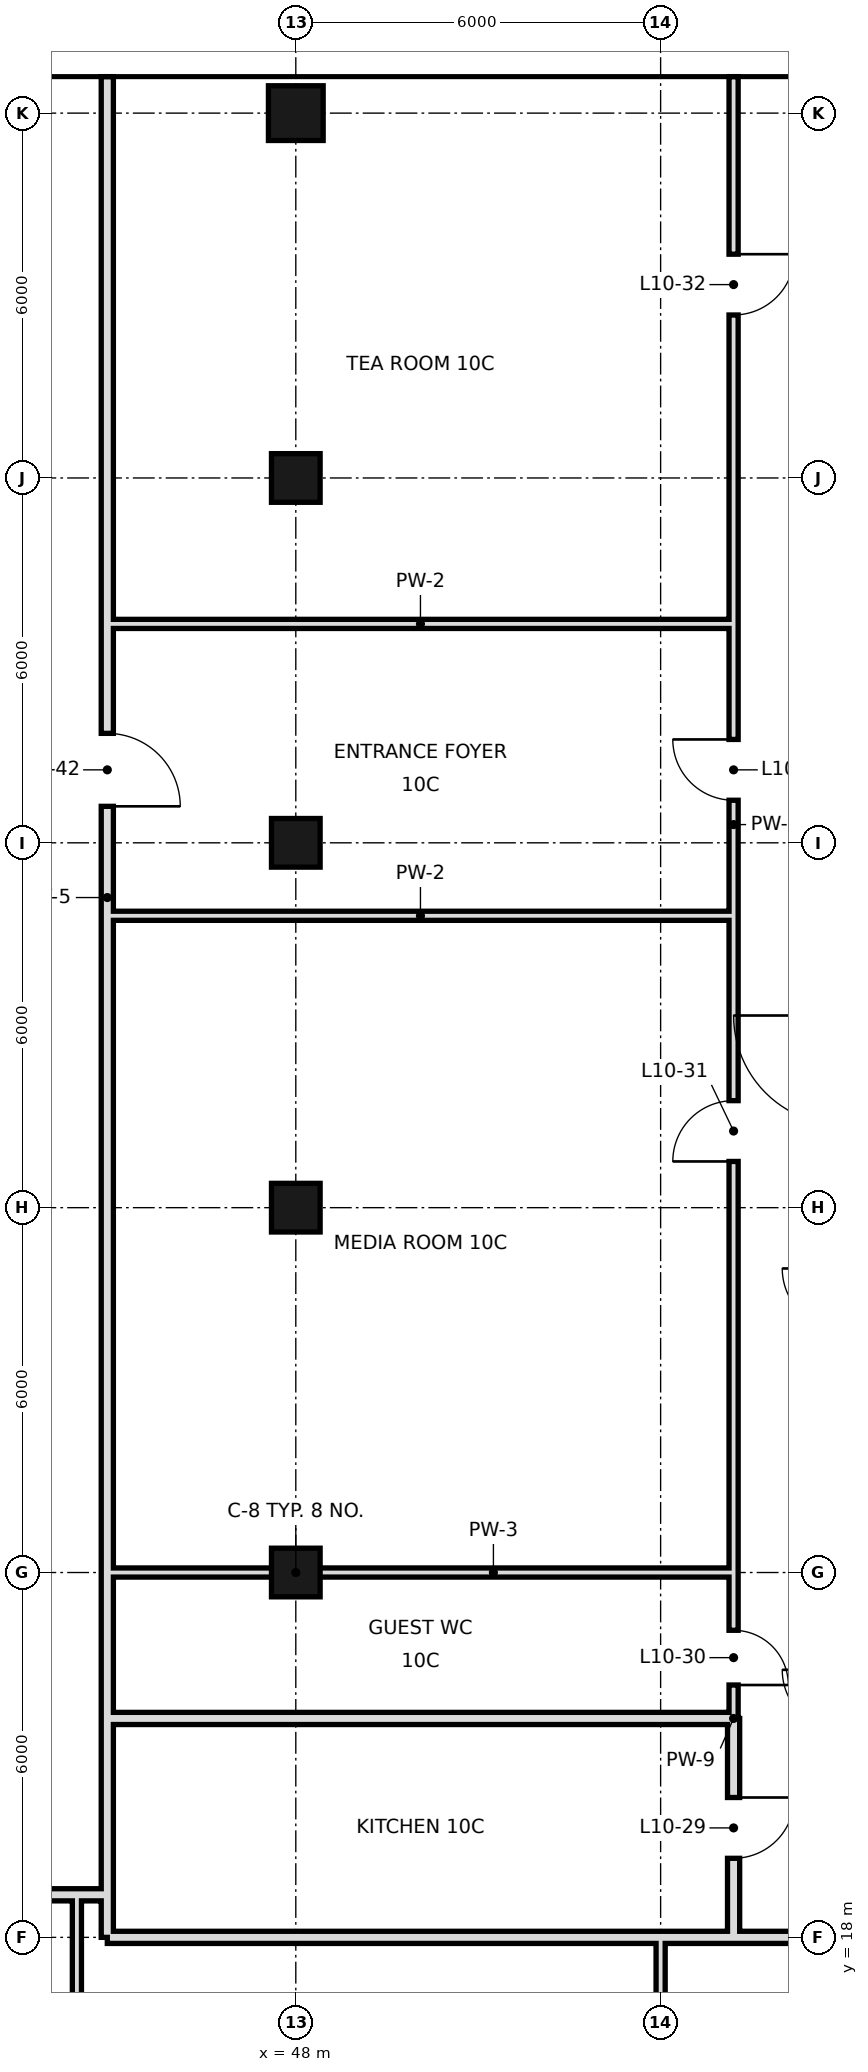
"""IFC4 building model, lengths in metres.
Left out: names, types, materials, properties, quantities, classifications, styles, units other than length and angle.
Written with IfcOpenShell. Run it as: python <this file> out.ifc"""

import sys

from ifc_helpers import new_model, si_unit, direction, frame, frame_2d, origin, origin_2d, place, context, subcontext, project, spatial, rectangle, hollow_rectangle, extrude, element, fill, save


model = new_model("IFC4")
c1 = context("Model", 3, precision=1e-05, world=origin(), true_north=direction((0.0, 1.0)))
c2 = subcontext(c1, "Body", "Model", "MODEL_VIEW")
j1 = project(units=[si_unit("LENGTHUNIT", "METRE"), si_unit("PLANEANGLEUNIT", "RADIAN")], contexts=[c1])
p1 = place(None, origin())
s1 = spatial("IfcSite", under=j1, at=p1, CompositionType="ELEMENT")
p2 = place(p1, origin())
s2 = spatial("IfcBuilding", under=s1, at=p2, CompositionType="ELEMENT")
p3 = place(p2, frame((0.0, 0.0, 57.0)))
s3 = spatial("IfcBuildingStorey", under=s2, at=p3, CompositionType="ELEMENT", Elevation=57.0)
for number, where, z_axis, x_axis in (
    (1, (48.0, 24.0, 0.0), (0.0, 0.0, 1.0), (1.0, 0.0, 0.0)),
    (2, (48.0, 30.0, 0.0), (0.0, 0.0, 1.0), (1.0, 0.0, 0.0)),
    (3, (48.0, 36.0, 0.0), (0.0, 0.0, 1.0), (1.0, 0.0, 0.0)),
    (4, (48.0, 42.0, 0.0), (0.0, 0.0, 1.0), (1.0, 0.0, 0.0)),
):
    element("IfcColumn", number, at=place(p3, frame(where, z_axis=z_axis, x_axis=x_axis)), inside=s3, PredefinedType="COLUMN", context=c2, shape_type="SweptSolid", body=[
        extrude(hollow_rectangle(XDim=0.8, YDim=0.8, WallThickness=0.04, at=origin_2d()), origin(), (0.0, 0.0, 1.0), 3.6),
    ])
p4 = place(p3, frame((48.0, 48.0, 0.0), z_axis=(0.0, 0.0, 1.0), x_axis=(1.0, 0.0, 0.0)))
e5 = element("IfcColumn", 5, at=p4, inside=s3, PredefinedType="COLUMN", context=c2, shape_type="SweptSolid", body=[
    extrude(hollow_rectangle(XDim=0.9, YDim=0.9, WallThickness=0.045, at=origin_2d()), origin(), (0.0, 0.0, 1.0), 3.6),
])
p5 = place(p3, frame((44.4, 10.8, 0.0), z_axis=(0.0, 0.0, 1.0), x_axis=(0.0, 1.0, 0.0)))
e6 = element("IfcWall", 6, at=p5, inside=s3, PredefinedType="PARTITIONING", context=c2, shape_type="SweptSolid", body=[
    extrude(rectangle(XDim=7.9, YDim=0.15, at=frame_2d((3.95, 0.0))), origin(), (0.0, 0.0, 1.0), 3.42),
])
p6 = place(p3, frame((44.9, 21.6, 0.0), z_axis=(0.0, 0.0, 1.0), x_axis=(0.0, 1.0, 0.0)))
e7 = element("IfcWall", 7, at=p6, inside=s3, PredefinedType="SOLIDWALL", context=c2, shape_type="SweptSolid", body=[
    extrude(rectangle(XDim=27.0, YDim=0.2, at=frame_2d((13.5, 0.0))), origin(), (0.0, 0.0, 1.0), 2.72),
])
p7 = place(p6, frame((15.0, 0.0, 0.0)))
e8 = element("IfcOpeningElement", 8, at=p7, cuts=e7, PredefinedType="OPENING", context=c2, shape_type="SweptSolid", body=[
    extrude(rectangle(XDim=1.2, YDim=2.4, at=frame_2d((0.6, 1.2))), frame((0.0, 0.11, 0.0), z_axis=(0.0, -1.0, 0.0), x_axis=(1.0, 0.0, 0.0)), (0.0, 0.0, 1.0), 0.22),
])
p8 = place(p3, frame((44.9, 18.0, 0.0), z_axis=(0.0, 0.0, 1.0), x_axis=(0.0, 1.0, 0.0)))
e9 = element("IfcWall", 9, at=p8, inside=s3, PredefinedType="SOLIDWALL", context=c2, shape_type="SweptSolid", body=[
    extrude(rectangle(XDim=3.6, YDim=0.2, at=frame_2d((1.8, 0.0))), origin(), (0.0, 0.0, 1.0), 2.97),
])
p9 = place(p3, frame((54.0, 10.8, 0.0), z_axis=(0.0, 0.0, 1.0), x_axis=(0.0, 1.0, 0.0)))
e10 = element("IfcWall", 10, at=p9, inside=s3, PredefinedType="PARTITIONING", context=c2, shape_type="SweptSolid", body=[
    extrude(rectangle(XDim=7.2, YDim=0.15, at=frame_2d((3.6, 0.0))), origin(), (0.0, 0.0, 1.0), 3.42),
])
p10 = place(p3, frame((55.2, 18.0, 0.0), z_axis=(0.0, 0.0, 1.0), x_axis=(0.0, 1.0, 0.0)))
e11 = element("IfcWall", 11, at=p10, inside=s3, PredefinedType="SOLIDWALL", context=c2, shape_type="SweptSolid", body=[
    extrude(rectangle(XDim=3.6, YDim=0.2, at=frame_2d((1.8, 0.0))), origin(), (0.0, 0.0, 1.0), 2.52),
])
p11 = place(p10, frame((1.3, 0.0, 0.0)))
e12 = element("IfcOpeningElement", 12, at=p11, cuts=e11, PredefinedType="OPENING", context=c2, shape_type="SweptSolid", body=[
    extrude(rectangle(XDim=1.0, YDim=2.4, at=frame_2d((0.5, 1.2))), frame((0.0, 0.11, 0.0), z_axis=(0.0, -1.0, 0.0), x_axis=(1.0, 0.0, 0.0)), (0.0, 0.0, 1.0), 0.22),
])
p12 = place(p3, frame((55.2, 24.0, 0.0), z_axis=(0.0, 0.0, 1.0), x_axis=(0.0, 1.0, 0.0)))
e13 = element("IfcWall", 13, at=p12, inside=s3, PredefinedType="PARTITIONING", context=c2, shape_type="SweptSolid", body=[
    extrude(rectangle(XDim=24.6, YDim=0.15, at=frame_2d((12.3, 0.0))), origin(), (0.0, 0.0, 1.0), 3.42),
])
p13 = place(p12, frame((12.7, 0.0, 0.0)))
e14 = element("IfcOpeningElement", 14, at=p13, cuts=e13, PredefinedType="OPENING", context=c2, shape_type="SweptSolid", body=[
    extrude(rectangle(XDim=1.0, YDim=2.4, at=frame_2d((0.5, 1.2))), frame((0.0, 0.085, 0.0), z_axis=(0.0, -1.0, 0.0), x_axis=(1.0, 0.0, 0.0)), (0.0, 0.0, 1.0), 0.17),
])
p14 = place(p12, frame((6.76, 0.0, 0.0)))
e15 = element("IfcOpeningElement", 15, at=p14, cuts=e13, PredefinedType="OPENING", context=c2, shape_type="SweptSolid", body=[
    extrude(rectangle(XDim=1.0, YDim=2.4, at=frame_2d((0.5, 1.2))), frame((0.0, 0.085, 0.0), z_axis=(0.0, -1.0, 0.0), x_axis=(1.0, 0.0, 0.0)), (0.0, 0.0, 1.0), 0.17),
])
p15 = place(p12, frame((20.68, 0.0, 0.0)))
e16 = element("IfcOpeningElement", 16, at=p15, cuts=e13, PredefinedType="OPENING", context=c2, shape_type="SweptSolid", body=[
    extrude(rectangle(XDim=1.0, YDim=2.4, at=frame_2d((0.5, 1.2))), frame((0.0, 0.085, 0.0), z_axis=(0.0, -1.0, 0.0), x_axis=(1.0, 0.0, 0.0)), (0.0, 0.0, 1.0), 0.17),
])
p16 = place(p3, frame((55.2, 21.6, 0.0), z_axis=(0.0, 0.0, 1.0), x_axis=(0.0, 1.0, 0.0)))
e17 = element("IfcWall", 17, at=p16, inside=s3, PredefinedType="PARTITIONING", context=c2, shape_type="SweptSolid", body=[
    extrude(rectangle(XDim=2.4, YDim=0.15, at=frame_2d((1.2, 0.0))), origin(), (0.0, 0.0, 1.0), 3.42),
])
p17 = place(p16, frame((0.55, 0.0, 0.0)))
e18 = element("IfcOpeningElement", 18, at=p17, cuts=e17, PredefinedType="OPENING", context=c2, shape_type="SweptSolid", body=[
    extrude(rectangle(XDim=0.9, YDim=2.4, at=frame_2d((0.45, 1.2))), frame((0.0, 0.085, 0.0), z_axis=(0.0, -1.0, 0.0), x_axis=(1.0, 0.0, 0.0)), (0.0, 0.0, 1.0), 0.17),
])
p18 = place(p3, frame((44.9, 18.0, 0.0), z_axis=(0.0, 0.0, 1.0), x_axis=(1.0, 0.0, 0.0)))
e19 = element("IfcWall", 19, at=p18, inside=s3, PredefinedType="SOLIDWALL", context=c2, shape_type="SweptSolid", body=[
    extrude(rectangle(XDim=10.3, YDim=0.2, at=frame_2d((5.15, 0.0))), origin(), (0.0, 0.0, 1.0), 2.52),
])
p19 = place(p3, frame((55.2, 18.0, 0.0), z_axis=(0.0, 0.0, 1.0), x_axis=(1.0, 0.0, 0.0)))
e20 = element("IfcWall", 20, at=p19, inside=s3, PredefinedType="SOLIDWALL", context=c2, shape_type="SweptSolid", body=[
    extrude(rectangle(XDim=5.4, YDim=0.2, at=frame_2d((2.7, 0.0))), origin(), (0.0, 0.0, 1.0), 2.52),
])
p20 = place(p3, frame((6.6, 18.7, 0.0), z_axis=(0.0, 0.0, 1.0), x_axis=(1.0, 0.0, 0.0)))
e21 = element("IfcWall", 21, at=p20, inside=s3, PredefinedType="SOLIDWALL", context=c2, shape_type="SweptSolid", body=[
    extrude(rectangle(XDim=38.3, YDim=0.2, at=frame_2d((19.15, 0.0))), origin(), (0.0, 0.0, 1.0), 2.72),
])
p21 = place(p20, frame((25.8, 0.0, 0.0)))
e22 = element("IfcOpeningElement", 22, at=p21, cuts=e21, PredefinedType="OPENING", context=c2, shape_type="SweptSolid", body=[
    extrude(rectangle(XDim=1.2, YDim=2.4, at=frame_2d((0.6, 1.2))), frame((0.0, 0.11, 0.0), z_axis=(0.0, -1.0, 0.0), x_axis=(1.0, 0.0, 0.0)), (0.0, 0.0, 1.0), 0.22),
])
p22 = place(p20, frame((33.34, 0.0, 0.0)))
e23 = element("IfcOpeningElement", 23, at=p22, cuts=e21, PredefinedType="OPENING", context=c2, shape_type="SweptSolid", body=[
    extrude(rectangle(XDim=1.2, YDim=2.4, at=frame_2d((0.6, 1.2))), frame((0.0, 0.11, 0.0), z_axis=(0.0, -1.0, 0.0), x_axis=(1.0, 0.0, 0.0)), (0.0, 0.0, 1.0), 0.22),
])
p23 = place(p3, frame((44.9, 21.6, 0.0), z_axis=(0.0, 0.0, 1.0), x_axis=(1.0, 0.0, 0.0)))
e24 = element("IfcWall", 24, at=p23, inside=s3, PredefinedType="SOLIDWALL", context=c2, shape_type="SweptSolid", body=[
    extrude(rectangle(XDim=10.3, YDim=0.2, at=frame_2d((5.15, 0.0))), origin(), (0.0, 0.0, 1.0), 2.72),
])
p24 = place(p3, frame((44.9, 24.0, 0.0), z_axis=(0.0, 0.0, 1.0), x_axis=(1.0, 0.0, 0.0)))
e25 = element("IfcWall", 25, at=p24, inside=s3, PredefinedType="PARTITIONING", context=c2, shape_type="SweptSolid", body=[
    extrude(rectangle(XDim=10.3, YDim=0.15, at=frame_2d((5.15, 0.0))), origin(), (0.0, 0.0, 1.0), 2.52),
])
for number, where, z_axis, x_axis in (
    (26, (44.9, 34.8, 0.0), (0.0, 0.0, 1.0), (1.0, 0.0, 0.0)),
    (27, (44.9, 39.6, 0.0), (0.0, 0.0, 1.0), (1.0, 0.0, 0.0)),
):
    element("IfcWall", number, at=place(p3, frame(where, z_axis=z_axis, x_axis=x_axis)), inside=s3, PredefinedType="PARTITIONING", context=c2, shape_type="SweptSolid", body=[
        extrude(rectangle(XDim=10.3, YDim=0.15, at=frame_2d((5.15, 0.0))), origin(), (0.0, 0.0, 1.0), 3.42),
    ])
p25 = place(p13, frame((1.0, 0.0, 0.0), z_axis=(0.0, 0.0, 1.0), x_axis=(-1.0, 0.0, 0.0)))
e28 = element("IfcDoor", 28, at=p25, inside=s3, OperationType="SINGLE_SWING_LEFT", PredefinedType="DOOR", context=c2, shape_type="SweptSolid", body=[
    extrude(rectangle(XDim=1.0, YDim=2.4, at=frame_2d((0.5, 1.2))), frame((0.0, 0.025, 0.0), z_axis=(0.0, -1.0, 0.0), x_axis=(1.0, 0.0, 0.0)), (0.0, 0.0, 1.0), 0.05),
])
fill(e14, e28)
p26 = place(p11, origin())
e29 = element("IfcDoor", 29, at=p26, inside=s3, OperationType="SINGLE_SWING_RIGHT", PredefinedType="DOOR", context=c2, shape_type="SweptSolid", body=[
    extrude(rectangle(XDim=1.0, YDim=2.4, at=frame_2d((0.5, 1.2))), frame((0.0, 0.025, 0.0), z_axis=(0.0, -1.0, 0.0), x_axis=(1.0, 0.0, 0.0)), (0.0, 0.0, 1.0), 0.05),
])
fill(e12, e29)
p27 = place(p17, frame((0.9, 0.0, 0.0), z_axis=(0.0, 0.0, 1.0), x_axis=(-1.0, 0.0, 0.0)))
e30 = element("IfcDoor", 30, at=p27, inside=s3, OperationType="SINGLE_SWING_RIGHT", PredefinedType="DOOR", context=c2, shape_type="SweptSolid", body=[
    extrude(rectangle(XDim=0.9, YDim=2.4, at=frame_2d((0.45, 1.2))), frame((0.0, 0.025, 0.0), z_axis=(0.0, -1.0, 0.0), x_axis=(1.0, 0.0, 0.0)), (0.0, 0.0, 1.0), 0.05),
])
fill(e18, e30)
p28 = place(p14, origin())
e31 = element("IfcDoor", 31, at=p28, inside=s3, OperationType="SINGLE_SWING_LEFT", PredefinedType="DOOR", context=c2, shape_type="SweptSolid", body=[
    extrude(rectangle(XDim=1.0, YDim=2.4, at=frame_2d((0.5, 1.2))), frame((0.0, 0.025, 0.0), z_axis=(0.0, -1.0, 0.0), x_axis=(1.0, 0.0, 0.0)), (0.0, 0.0, 1.0), 0.05),
])
fill(e15, e31)
p29 = place(p15, origin())
e32 = element("IfcDoor", 32, at=p29, inside=s3, OperationType="SINGLE_SWING_RIGHT", PredefinedType="DOOR", context=c2, shape_type="SweptSolid", body=[
    extrude(rectangle(XDim=1.0, YDim=2.4, at=frame_2d((0.5, 1.2))), frame((0.0, 0.025, 0.0), z_axis=(0.0, -1.0, 0.0), x_axis=(1.0, 0.0, 0.0)), (0.0, 0.0, 1.0), 0.05),
])
fill(e16, e32)
p30 = place(p7, frame((1.2, 0.0, 0.0), z_axis=(0.0, 0.0, 1.0), x_axis=(-1.0, 0.0, 0.0)))
e33 = element("IfcDoor", 33, at=p30, inside=s3, OperationType="SINGLE_SWING_RIGHT", PredefinedType="DOOR", context=c2, shape_type="SweptSolid", body=[
    extrude(rectangle(XDim=1.2, YDim=2.4, at=frame_2d((0.6, 1.2))), frame((0.0, 0.025, 0.0), z_axis=(0.0, -1.0, 0.0), x_axis=(1.0, 0.0, 0.0)), (0.0, 0.0, 1.0), 0.05),
])
fill(e8, e33)
save(model, sys.argv[1])
